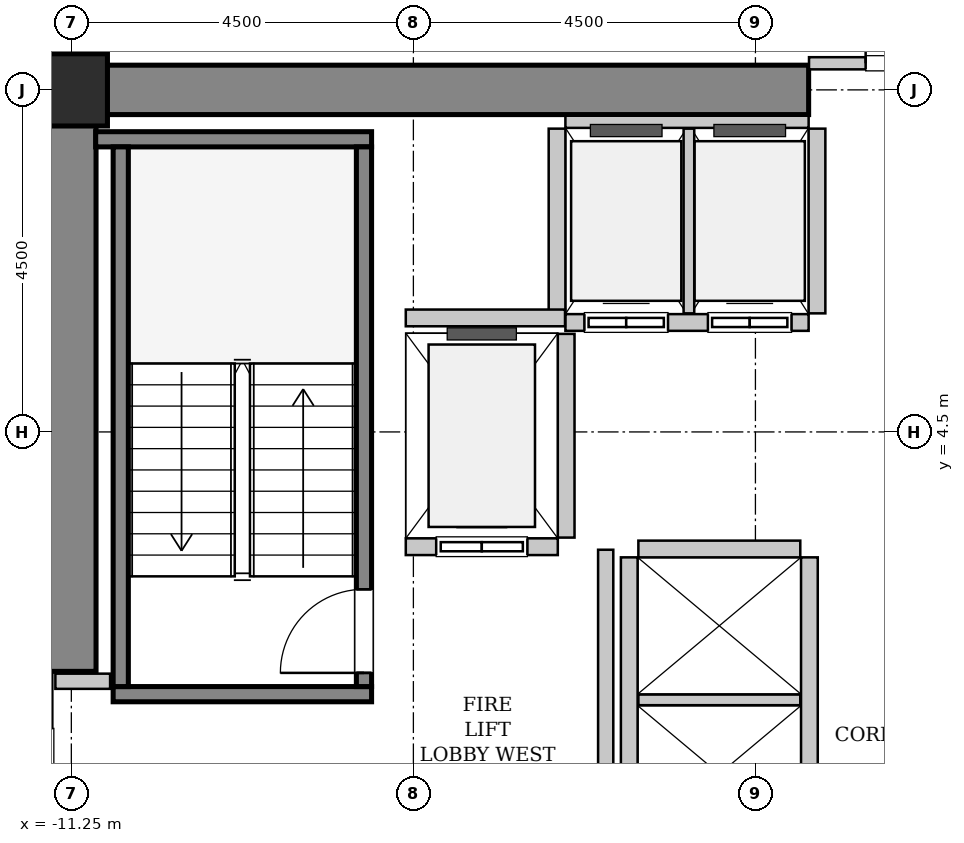
"""IFC4 building model, lengths in metres.
Left out: names, types, materials, properties, quantities, classifications, styles, units other than length and angle.
Written with IfcOpenShell. Run it as: python <this file> out.ifc"""

import sys

from ifc_helpers import new_model, si_unit, direction, frame, frame_2d, origin, origin_2d, place, context, subcontext, project, spatial, rectangle, hollow_rectangle, extrude, source, transform, mapped, element, fill, save


model = new_model("IFC4")
c1 = context("Model", 3, precision=1e-05, world=origin(), true_north=direction((0.0, 1.0)))
c2 = subcontext(c1, "Body", "Model", "MODEL_VIEW")
j1 = project(units=[si_unit("LENGTHUNIT", "METRE"), si_unit("PLANEANGLEUNIT", "RADIAN")], contexts=[c1])
p1 = place(None, origin())
s1 = spatial("IfcSite", under=j1, at=p1, CompositionType="ELEMENT")
p2 = place(p1, origin())
s2 = spatial("IfcBuilding", under=s1, at=p2, CompositionType="ELEMENT")
p3 = place(p2, frame((0.0, 0.0, 74.8)))
s3 = spatial("IfcBuildingStorey", under=s2, at=p3, CompositionType="ELEMENT", Elevation=74.8)
m1 = source(origin(), c2, "Body", "SweptSolid", [
    extrude(rectangle(XDim=10.025, YDim=0.65, at=frame_2d((5.012, 0.0))), origin(), (0.0, 0.0, 1.0), 3.8),
])
p4 = place(p3, frame((-11.575, 9.0, 0.0), z_axis=(0.0, 0.0, 1.0), x_axis=(1.0, 0.0, 0.0)))
e1 = element("IfcWall", 1, at=p4, inside=s3, PredefinedType="SHEAR", context=c2, shape_type="MappedRepresentation", body=[
    mapped(m1, transform((0.0, 0.0, 0.0), x_axis=(1.0, 0.0, 0.0), y_axis=(0.0, 1.0, 0.0), z_axis=(0.0, 0.0, 1.0), scale=1.0)),
])
m2 = source(origin(), c2, "Body", "SweptSolid", [
    extrude(rectangle(XDim=7.325, YDim=0.65, at=frame_2d((3.663, 0.0))), origin(), (0.0, 0.0, 1.0), 3.8),
])
p5 = place(p3, frame((-11.25, 1.35, 0.0), z_axis=(0.0, 0.0, 1.0), x_axis=(0.0, 1.0, 0.0)))
e2 = element("IfcWall", 2, at=p5, inside=s3, PredefinedType="SHEAR", context=c2, shape_type="MappedRepresentation", body=[
    mapped(m2, transform((0.0, 0.0, 0.0), x_axis=(1.0, 0.0, 0.0), y_axis=(0.0, 1.0, 0.0), z_axis=(0.0, 0.0, 1.0), scale=1.0)),
])
m3 = source(origin(), c2, "Body", "SweptSolid", [
    extrude(hollow_rectangle(XDim=0.95, YDim=0.95, WallThickness=0.045, InnerFilletRadius=0.045, OuterFilletRadius=0.09, at=origin_2d()), origin(), (0.0, 0.0, 1.0), 3.8),
])
p6 = place(p3, frame((-11.25, 9.0, 0.0), z_axis=(0.0, 0.0, 1.0), x_axis=(1.0, 0.0, 0.0)))
e3 = element("IfcColumn", 3, at=p6, inside=s3, PredefinedType="COLUMN", context=c2, shape_type="MappedRepresentation", body=[
    mapped(m3, transform((0.0, 0.0, 0.0), x_axis=(1.0, 0.0, 0.0), y_axis=(0.0, 1.0, 0.0), z_axis=(0.0, 0.0, 1.0), scale=1.0)),
])
m4 = source(origin(), c2, "Body", "SweptSolid", [
    extrude(rectangle(XDim=3.4, YDim=0.2, at=frame_2d((1.7, 0.0))), origin(), (0.0, 0.0, 1.0), 3.8),
])
p7 = place(p3, frame((-7.3, 1.05, 0.0), z_axis=(0.0, 0.0, 1.0), x_axis=(-1.0, 0.0, 0.0)))
e4 = element("IfcWall", 4, at=p7, inside=s3, PredefinedType="SOLIDWALL", context=c2, shape_type="MappedRepresentation", body=[
    mapped(m4, transform((0.0, 0.0, 0.0), x_axis=(1.0, 0.0, 0.0), y_axis=(0.0, 1.0, 0.0), z_axis=(0.0, 0.0, 1.0), scale=1.0)),
])
m5 = source(origin(), c2, "Body", "SweptSolid", [
    extrude(rectangle(XDim=3.63, YDim=0.2, at=frame_2d((1.815, 0.0))), origin(), (0.0, 0.0, 1.0), 3.8),
])
p8 = place(p3, frame((-7.3, 8.35, 0.0), z_axis=(0.0, 0.0, 1.0), x_axis=(-1.0, 0.0, 0.0)))
e5 = element("IfcWall", 5, at=p8, inside=s3, PredefinedType="SOLIDWALL", context=c2, shape_type="MappedRepresentation", body=[
    mapped(m5, transform((0.0, 0.0, 0.0), x_axis=(1.0, 0.0, 0.0), y_axis=(0.0, 1.0, 0.0), z_axis=(0.0, 0.0, 1.0), scale=1.0)),
])
m6 = source(origin(), c2, "Body", "SweptSolid", [
    extrude(rectangle(XDim=7.1, YDim=0.2, at=frame_2d((3.55, 0.0))), origin(), (0.0, 0.0, 1.0), 3.8),
])
p9 = place(p3, frame((-7.4, 1.15, 0.0), z_axis=(0.0, 0.0, 1.0), x_axis=(0.0, 1.0, 0.0)))
e6 = element("IfcWall", 6, at=p9, inside=s3, PredefinedType="SOLIDWALL", context=c2, shape_type="MappedRepresentation", body=[
    mapped(m6, transform((0.0, 0.0, 0.0), x_axis=(1.0, 0.0, 0.0), y_axis=(0.0, 1.0, 0.0), z_axis=(0.0, 0.0, 1.0), scale=1.0)),
])
p10 = place(p9, frame((0.18, 0.0, 0.0)))
e7 = element("IfcOpeningElement", 7, at=p10, cuts=e6, PredefinedType="OPENING", context=c2, shape_type="SweptSolid", body=[
    extrude(rectangle(XDim=1.1, YDim=2.15, at=frame_2d((0.55, 1.075))), frame((0.0, 0.11, 0.0), z_axis=(0.0, -1.0, 0.0), x_axis=(1.0, 0.0, 0.0)), (0.0, 0.0, 1.0), 0.22),
])
p11 = place(p3, frame((-10.6, 1.15, 0.0), z_axis=(0.0, 0.0, 1.0), x_axis=(0.0, 1.0, 0.0)))
e8 = element("IfcWall", 8, at=p11, inside=s3, PredefinedType="SOLIDWALL", context=c2, shape_type="MappedRepresentation", body=[
    mapped(m6, transform((0.0, 0.0, 0.0), x_axis=(1.0, 0.0, 0.0), y_axis=(0.0, 1.0, 0.0), z_axis=(0.0, 0.0, 1.0), scale=1.0)),
])
m7 = source(origin(), c2, "Body", "SweptSolid", [
    extrude(rectangle(XDim=2.0, YDim=0.22, at=frame_2d((1.0, 0.0))), origin(), (0.0, 0.0, 1.0), 3.535),
])
p12 = place(p3, frame((-6.85, 2.99, 0.0), z_axis=(0.0, 0.0, 1.0), x_axis=(1.0, 0.0, 0.0)))
e9 = element("IfcWall", 9, at=p12, inside=s3, PredefinedType="SOLIDWALL", context=c2, shape_type="MappedRepresentation", body=[
    mapped(m7, transform((0.0, 0.0, 0.0), x_axis=(1.0, 0.0, 0.0), y_axis=(0.0, 1.0, 0.0), z_axis=(0.0, 0.0, 1.0), scale=1.0)),
])
p13 = place(p12, frame((0.4, 0.0, 0.0)))
e10 = element("IfcOpeningElement", 10, at=p13, cuts=e9, PredefinedType="OPENING", context=c2, shape_type="SweptSolid", body=[
    extrude(rectangle(XDim=1.2, YDim=2.2, at=frame_2d((0.6, 1.1))), frame((0.0, 0.12, 0.0), z_axis=(0.0, -1.0, 0.0), x_axis=(1.0, 0.0, 0.0)), (0.0, 0.0, 1.0), 0.24),
])
m8 = source(origin(), c2, "Body", "SweptSolid", [
    extrude(rectangle(XDim=2.68, YDim=0.22, at=frame_2d((1.34, 0.0))), origin(), (0.0, 0.0, 1.0), 3.535),
])
p14 = place(p3, frame((-4.74, 3.11, 0.0), z_axis=(0.0, 0.0, 1.0), x_axis=(0.0, 1.0, 0.0)))
e11 = element("IfcWall", 11, at=p14, inside=s3, PredefinedType="SOLIDWALL", context=c2, shape_type="MappedRepresentation", body=[
    mapped(m8, transform((0.0, 0.0, 0.0), x_axis=(1.0, 0.0, 0.0), y_axis=(0.0, 1.0, 0.0), z_axis=(0.0, 0.0, 1.0), scale=1.0)),
])
m9 = source(origin(), c2, "Body", "SweptSolid", [
    extrude(rectangle(XDim=3.2, YDim=0.22, at=frame_2d((1.6, 0.0))), origin(), (0.0, 0.0, 1.0), 3.535),
])
p15 = place(p3, frame((-4.75, 5.94, 0.0), z_axis=(0.0, 0.0, 1.0), x_axis=(1.0, 0.0, 0.0)))
e12 = element("IfcWall", 12, at=p15, inside=s3, PredefinedType="SOLIDWALL", context=c2, shape_type="MappedRepresentation", body=[
    mapped(m9, transform((0.0, 0.0, 0.0), x_axis=(1.0, 0.0, 0.0), y_axis=(0.0, 1.0, 0.0), z_axis=(0.0, 0.0, 1.0), scale=1.0)),
])
p16 = place(p15, frame((0.25, 0.0, 0.0)))
e13 = element("IfcOpeningElement", 13, at=p16, cuts=e12, PredefinedType="OPENING", context=c2, shape_type="SweptSolid", body=[
    extrude(rectangle(XDim=1.1, YDim=2.2, at=frame_2d((0.55, 1.1))), frame((0.0, 0.12, 0.0), z_axis=(0.0, -1.0, 0.0), x_axis=(1.0, 0.0, 0.0)), (0.0, 0.0, 1.0), 0.24),
])
p17 = place(p15, frame((1.875, 0.0, 0.0)))
e14 = element("IfcOpeningElement", 14, at=p17, cuts=e12, PredefinedType="OPENING", context=c2, shape_type="SweptSolid", body=[
    extrude(rectangle(XDim=1.1, YDim=2.2, at=frame_2d((0.55, 1.1))), frame((0.0, 0.12, 0.0), z_axis=(0.0, -1.0, 0.0), x_axis=(1.0, 0.0, 0.0)), (0.0, 0.0, 1.0), 0.24),
])
m10 = source(origin(), c2, "Body", "SweptSolid", [
    extrude(rectangle(XDim=3.2, YDim=0.16, at=frame_2d((1.6, 0.0))), origin(), (0.0, 0.0, 1.0), 2.425),
])
p18 = place(p3, frame((-1.55, 8.58, 0.0), z_axis=(0.0, 0.0, 1.0), x_axis=(-1.0, 0.0, 0.0)))
e15 = element("IfcWall", 15, at=p18, inside=s3, PredefinedType="PARTITIONING", context=c2, shape_type="MappedRepresentation", body=[
    mapped(m10, transform((0.0, 0.0, 0.0), x_axis=(1.0, 0.0, 0.0), y_axis=(0.0, 1.0, 0.0), z_axis=(0.0, 0.0, 1.0), scale=1.0)),
])
m11 = source(origin(), c2, "Body", "SweptSolid", [
    extrude(rectangle(XDim=2.43, YDim=0.22, at=frame_2d((1.215, 0.0))), origin(), (0.0, 0.0, 1.0), 3.535),
])
p19 = place(p3, frame((-4.86, 8.49, 0.0), z_axis=(0.0, 0.0, 1.0), x_axis=(0.0, -1.0, 0.0)))
e16 = element("IfcWall", 16, at=p19, inside=s3, PredefinedType="SOLIDWALL", context=c2, shape_type="MappedRepresentation", body=[
    mapped(m11, transform((0.0, 0.0, 0.0), x_axis=(1.0, 0.0, 0.0), y_axis=(0.0, 1.0, 0.0), z_axis=(0.0, 0.0, 1.0), scale=1.0)),
])
m12 = source(origin(), c2, "Body", "SweptSolid", [
    extrude(rectangle(XDim=2.43, YDim=0.14, at=frame_2d((1.215, 0.0))), origin(), (0.0, 0.0, 1.0), 3.535),
])
p20 = place(p3, frame((-3.125, 6.06, 0.0), z_axis=(0.0, 0.0, 1.0), x_axis=(0.0, 1.0, 0.0)))
e17 = element("IfcWall", 17, at=p20, inside=s3, PredefinedType="PARTITIONING", context=c2, shape_type="MappedRepresentation", body=[
    mapped(m12, transform((0.0, 0.0, 0.0), x_axis=(1.0, 0.0, 0.0), y_axis=(0.0, 1.0, 0.0), z_axis=(0.0, 0.0, 1.0), scale=1.0)),
])
p21 = place(p3, frame((-1.44, 6.06, 0.0), z_axis=(0.0, 0.0, 1.0), x_axis=(0.0, 1.0, 0.0)))
e18 = element("IfcWall", 18, at=p21, inside=s3, PredefinedType="SOLIDWALL", context=c2, shape_type="MappedRepresentation", body=[
    mapped(m11, transform((0.0, 0.0, 0.0), x_axis=(1.0, 0.0, 0.0), y_axis=(0.0, 1.0, 0.0), z_axis=(0.0, 0.0, 1.0), scale=1.0)),
])
m13 = source(origin(), c2, "Body", "SweptSolid", [
    extrude(rectangle(XDim=5.7, YDim=0.22, at=frame_2d((2.85, 0.0))), origin(), (0.0, 0.0, 1.0), 3.535),
])
for number, where, z_axis, x_axis in (
    (19, (-1.54, -2.85, 0.0), (0.0, 0.0, 1.0), (0.0, 1.0, 0.0)),
    (20, (-3.91, 2.85, 0.0), (0.0, 0.0, 1.0), (0.0, -1.0, 0.0)),
):
    element("IfcWall", number, at=place(p3, frame(where, z_axis=z_axis, x_axis=x_axis)), inside=s3, PredefinedType="SOLIDWALL", context=c2, shape_type="MappedRepresentation", body=[
        mapped(m13, transform((0.0, 0.0, 0.0), x_axis=(1.0, 0.0, 0.0), y_axis=(0.0, 1.0, 0.0), z_axis=(0.0, 0.0, 1.0), scale=1.0)),
    ])
m14 = source(origin(), c2, "Body", "SweptSolid", [
    extrude(rectangle(XDim=2.13, YDim=0.14, at=frame_2d((1.065, 0.0))), origin(), (0.0, 0.0, 1.0), 3.535),
])
p22 = place(p3, frame((-3.79, 0.975, 0.0), z_axis=(0.0, 0.0, 1.0), x_axis=(1.0, 0.0, 0.0)))
e21 = element("IfcWall", 21, at=p22, inside=s3, PredefinedType="PARTITIONING", context=c2, shape_type="MappedRepresentation", body=[
    mapped(m14, transform((0.0, 0.0, 0.0), x_axis=(1.0, 0.0, 0.0), y_axis=(0.0, 1.0, 0.0), z_axis=(0.0, 0.0, 1.0), scale=1.0)),
])
m15 = source(origin(), c2, "Body", "SweptSolid", [
    extrude(rectangle(XDim=2.13, YDim=0.22, at=frame_2d((1.065, 0.0))), origin(), (0.0, 0.0, 1.0), 3.535),
])
p23 = place(p3, frame((-1.66, 2.96, 0.0), z_axis=(0.0, 0.0, 1.0), x_axis=(-1.0, 0.0, 0.0)))
e22 = element("IfcWall", 22, at=p23, inside=s3, PredefinedType="SOLIDWALL", context=c2, shape_type="MappedRepresentation", body=[
    mapped(m15, transform((0.0, 0.0, 0.0), x_axis=(1.0, 0.0, 0.0), y_axis=(0.0, 1.0, 0.0), z_axis=(0.0, 0.0, 1.0), scale=1.0)),
])
m16 = source(origin(), c2, "Body", "SweptSolid", [
    extrude(rectangle(XDim=2.095, YDim=0.22, at=frame_2d((1.048, 0.0))), origin(), (0.0, 0.0, 1.0), 3.535),
])
p24 = place(p3, frame((-6.85, 6.0, 0.0), z_axis=(0.0, 0.0, 1.0), x_axis=(1.0, 0.0, 0.0)))
e23 = element("IfcWall", 23, at=p24, inside=s3, PredefinedType="SOLIDWALL", context=c2, shape_type="MappedRepresentation", body=[
    mapped(m16, transform((0.0, 0.0, 0.0), x_axis=(1.0, 0.0, 0.0), y_axis=(0.0, 1.0, 0.0), z_axis=(0.0, 0.0, 1.0), scale=1.0)),
])
m17 = source(origin(), c2, "Body", "SweptSolid", [
    extrude(rectangle(XDim=5.9, YDim=0.2, at=frame_2d((2.95, 0.0))), origin(), (0.0, 0.0, 1.0), 3.535),
])
p25 = place(p3, frame((-4.22, -2.95, 0.0), z_axis=(0.0, 0.0, 1.0), x_axis=(0.0, 1.0, 0.0)))
e24 = element("IfcWall", 24, at=p25, inside=s3, PredefinedType="PARTITIONING", context=c2, shape_type="MappedRepresentation", body=[
    mapped(m17, transform((0.0, 0.0, 0.0), x_axis=(1.0, 0.0, 0.0), y_axis=(0.0, 1.0, 0.0), z_axis=(0.0, 0.0, 1.0), scale=1.0)),
])
m18 = source(origin(), c2, "Body", "SweptSolid", [
    extrude(rectangle(XDim=0.72, YDim=0.2, at=frame_2d((0.36, 0.0))), origin(), (0.0, 0.0, 1.0), 3.535),
])
p26 = place(p3, frame((-11.46, 1.22, 0.0), z_axis=(0.0, 0.0, 1.0), x_axis=(1.0, 0.0, 0.0)))
e25 = element("IfcWall", 25, at=p26, inside=s3, PredefinedType="PARTITIONING", context=c2, shape_type="MappedRepresentation", body=[
    mapped(m18, transform((0.0, 0.0, 0.0), x_axis=(1.0, 0.0, 0.0), y_axis=(0.0, 1.0, 0.0), z_axis=(0.0, 0.0, 1.0), scale=1.0)),
])
m19 = source(origin(), c2, "Body", "SweptSolid", [
    extrude(rectangle(XDim=3.09, YDim=0.16, at=frame_2d((1.545, 0.0))), origin(), (0.0, 0.0, 1.0), 2.425),
])
p27 = place(p3, frame((-1.545, 9.35, 0.0), z_axis=(0.0, 0.0, 1.0), x_axis=(1.0, 0.0, 0.0)))
e26 = element("IfcWall", 26, at=p27, inside=s3, PredefinedType="PARTITIONING", context=c2, shape_type="MappedRepresentation", body=[
    mapped(m19, transform((0.0, 0.0, 0.0), x_axis=(1.0, 0.0, 0.0), y_axis=(0.0, 1.0, 0.0), z_axis=(0.0, 0.0, 1.0), scale=1.0)),
])
p28 = place(p27, frame((0.745, 0.0, 0.0)))
e27 = element("IfcOpeningElement", 27, at=p28, cuts=e26, PredefinedType="OPENING", context=c2, shape_type="SweptSolid", body=[
    extrude(rectangle(XDim=1.6, YDim=2.3, at=frame_2d((0.8, 1.15))), frame((0.0, 0.09, 0.0), z_axis=(0.0, -1.0, 0.0), x_axis=(1.0, 0.0, 0.0)), (0.0, 0.0, 1.0), 0.18),
])
m20 = source(origin(), c2, "Body", "SweptSolid", [
    extrude(rectangle(XDim=1.1, YDim=2.15, at=frame_2d((0.55, 1.075))), frame((0.0, 0.025, 0.0), z_axis=(0.0, -1.0, 0.0), x_axis=(1.0, 0.0, 0.0)), (0.0, 0.0, 1.0), 0.05),
])
p29 = place(p10, origin())
e28 = element("IfcDoor", 28, at=p29, inside=s3, OperationType="SINGLE_SWING_LEFT", PredefinedType="DOOR", context=c2, shape_type="MappedRepresentation", body=[
    mapped(m20, transform((0.0, 0.0, 0.0), x_axis=(1.0, 0.0, 0.0), y_axis=(0.0, 1.0, 0.0), z_axis=(0.0, 0.0, 1.0), scale=1.0)),
])
fill(e7, e28)
m21 = source(origin(), c2, "Body", "SweptSolid", [
    extrude(rectangle(XDim=1.2, YDim=2.2, at=frame_2d((0.6, 1.1))), frame((0.0, 0.025, 0.0), z_axis=(0.0, -1.0, 0.0), x_axis=(1.0, 0.0, 0.0)), (0.0, 0.0, 1.0), 0.05),
])
p30 = place(p13, origin())
e29 = element("IfcDoor", 29, at=p30, inside=s3, OperationType="SLIDING_TO_LEFT", PredefinedType="DOOR", context=c2, shape_type="MappedRepresentation", body=[
    mapped(m21, transform((0.0, 0.0, 0.0), x_axis=(1.0, 0.0, 0.0), y_axis=(0.0, 1.0, 0.0), z_axis=(0.0, 0.0, 1.0), scale=1.0)),
])
fill(e10, e29)
m22 = source(origin(), c2, "Body", "SweptSolid", [
    extrude(rectangle(XDim=1.1, YDim=2.2, at=frame_2d((0.55, 1.1))), frame((0.0, 0.025, 0.0), z_axis=(0.0, -1.0, 0.0), x_axis=(1.0, 0.0, 0.0)), (0.0, 0.0, 1.0), 0.05),
])
p31 = place(p16, origin())
e30 = element("IfcDoor", 30, at=p31, inside=s3, OperationType="DOUBLE_DOOR_SLIDING", PredefinedType="DOOR", context=c2, shape_type="MappedRepresentation", body=[
    mapped(m22, transform((0.0, 0.0, 0.0), x_axis=(1.0, 0.0, 0.0), y_axis=(0.0, 1.0, 0.0), z_axis=(0.0, 0.0, 1.0), scale=1.0)),
])
fill(e13, e30)
p32 = place(p17, origin())
e31 = element("IfcDoor", 31, at=p32, inside=s3, OperationType="DOUBLE_DOOR_SLIDING", PredefinedType="DOOR", context=c2, shape_type="MappedRepresentation", body=[
    mapped(m22, transform((0.0, 0.0, 0.0), x_axis=(1.0, 0.0, 0.0), y_axis=(0.0, 1.0, 0.0), z_axis=(0.0, 0.0, 1.0), scale=1.0)),
])
fill(e14, e31)
m23 = source(origin(), c2, "Body", "SweptSolid", [
    extrude(rectangle(XDim=1.6, YDim=2.3, at=frame_2d((0.8, 1.15))), frame((0.0, 0.025, 0.0), z_axis=(0.0, -1.0, 0.0), x_axis=(1.0, 0.0, 0.0)), (0.0, 0.0, 1.0), 0.05),
])
p33 = place(p28, origin())
e32 = element("IfcDoor", 32, at=p33, inside=s3, OperationType="DOUBLE_DOOR_SINGLE_SWING", PredefinedType="DOOR", context=c2, shape_type="MappedRepresentation", body=[
    mapped(m23, transform((0.0, 0.0, 0.0), x_axis=(1.0, 0.0, 0.0), y_axis=(0.0, 1.0, 0.0), z_axis=(0.0, 0.0, 1.0), scale=1.0)),
])
fill(e27, e32)
save(model, sys.argv[1])
